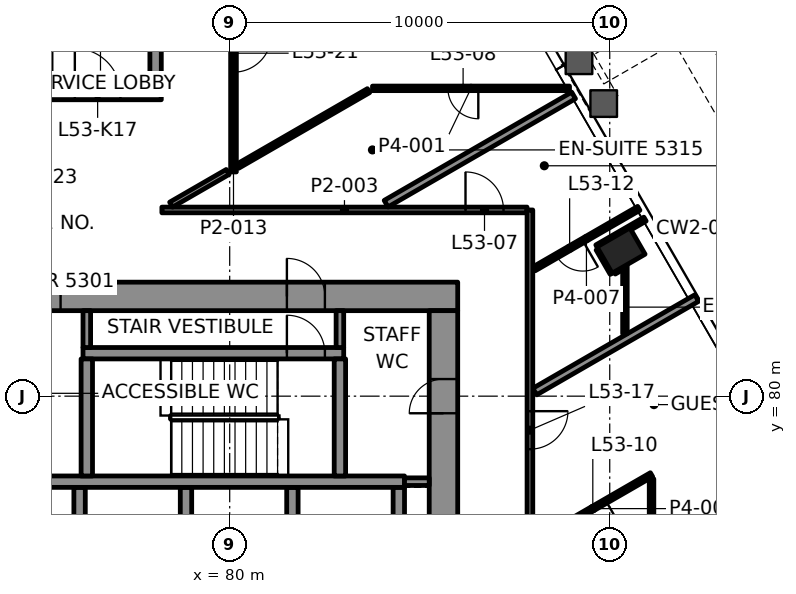
"""IFC4 building model, lengths in metres.
Left out: names, types, materials, properties, quantities, classifications, styles, units other than length and angle.
Written with IfcOpenShell. Run it as: python <this file> out.ifc"""

import sys

from ifc_helpers import new_model, si_unit, direction, frame, frame_2d, origin, origin_2d, place, context, subcontext, project, spatial, rectangle, hollow_rectangle, extrude, element, fill, save


model = new_model("IFC4")
c1 = context("Model", 3, precision=1e-05, world=origin(), true_north=direction((0.0, 1.0)))
c2 = subcontext(c1, "Body", "Model", "MODEL_VIEW")
j1 = project(units=[si_unit("LENGTHUNIT", "METRE"), si_unit("PLANEANGLEUNIT", "RADIAN")], contexts=[c1])
p1 = place(None, origin())
s1 = spatial("IfcSite", under=j1, at=p1, CompositionType="ELEMENT")
p2 = place(p1, origin())
s2 = spatial("IfcBuilding", under=s1, at=p2, CompositionType="ELEMENT")
p3 = place(p2, frame((0.0, 0.0, 226.0)))
s3 = spatial("IfcBuildingStorey", under=s2, at=p3, CompositionType="ELEMENT", Elevation=226.0)
p4 = place(p3, frame((90.297, 83.832, -0.0), z_axis=(0.0, 0.0, 1.0), x_axis=(-0.5, 0.866025403784, 0.0)))
e1 = element("IfcColumn", 1, at=p4, inside=s3, PredefinedType="COLUMN", context=c2, shape_type="SweptSolid", body=[
    extrude(hollow_rectangle(XDim=0.8, YDim=1.0, WallThickness=0.05, at=origin_2d()), origin(), (0.0, 0.0, 1.0), 3.9),
])
p5 = place(p3, frame((64.0, 82.625, 0.0), z_axis=(0.0, 0.0, 1.0), x_axis=(1.0, 0.0, 0.0)))
e2 = element("IfcWall", 2, at=p5, inside=s3, PredefinedType="SHEAR", context=c2, shape_type="SweptSolid", body=[
    extrude(rectangle(XDim=22.0, YDim=0.75, at=frame_2d((11.0, 0.0))), origin(), (0.0, 0.0, 1.0), 3.7),
])
p6 = place(p5, frame((3.695, 0.0, 0.0)))
e3 = element("IfcOpeningElement", 3, at=p6, cuts=e2, PredefinedType="OPENING", context=c2, shape_type="SweptSolid", body=[
    extrude(rectangle(XDim=1.0, YDim=2.1, at=frame_2d((0.5, 1.05))), frame((0.0, 0.385, 0.0), z_axis=(0.0, -1.0, 0.0), x_axis=(1.0, 0.0, 0.0)), (0.0, 0.0, 1.0), 0.77),
])
p7 = place(p5, frame((17.505, 0.0, 0.0)))
e4 = element("IfcOpeningElement", 4, at=p7, cuts=e2, PredefinedType="OPENING", context=c2, shape_type="SweptSolid", body=[
    extrude(rectangle(XDim=1.0, YDim=2.1, at=frame_2d((0.5, 1.05))), frame((0.0, 0.385, 0.0), z_axis=(0.0, -1.0, 0.0), x_axis=(1.0, 0.0, 0.0)), (0.0, 0.0, 1.0), 0.77),
])
p8 = place(p5, frame((10.65, 0.0, 0.0)))
e5 = element("IfcOpeningElement", 5, at=p8, cuts=e2, PredefinedType="OPENING", context=c2, shape_type="SweptSolid", body=[
    extrude(rectangle(XDim=0.9, YDim=2.1, at=frame_2d((0.45, 1.05))), frame((0.0, 0.385, 0.0), z_axis=(0.0, -1.0, 0.0), x_axis=(1.0, 0.0, 0.0)), (0.0, 0.0, 1.0), 0.77),
])
p9 = place(p3, frame((85.625, 67.75, 0.0), z_axis=(0.0, 0.0, 1.0), x_axis=(0.0, 1.0, 0.0)))
e6 = element("IfcWall", 6, at=p9, inside=s3, PredefinedType="SHEAR", context=c2, shape_type="SweptSolid", body=[
    extrude(rectangle(XDim=14.5, YDim=0.75, at=frame_2d((7.25, 0.0))), origin(), (0.0, 0.0, 1.0), 3.7),
])
p10 = place(p9, frame((4.65, 0.0, 0.0)))
e7 = element("IfcOpeningElement", 7, at=p10, cuts=e6, PredefinedType="OPENING", context=c2, shape_type="SweptSolid", body=[
    extrude(rectangle(XDim=1.8, YDim=2.1, at=frame_2d((0.9, 1.05))), frame((0.0, 0.385, 0.0), z_axis=(0.0, -1.0, 0.0), x_axis=(1.0, 0.0, 0.0)), (0.0, 0.0, 1.0), 0.77),
])
p11 = place(p9, frame((11.8, 0.0, 0.0)))
e8 = element("IfcOpeningElement", 8, at=p11, cuts=e6, PredefinedType="OPENING", context=c2, shape_type="SweptSolid", body=[
    extrude(rectangle(XDim=0.9, YDim=2.1, at=frame_2d((0.45, 1.05))), frame((0.0, 0.385, 0.0), z_axis=(0.0, -1.0, 0.0), x_axis=(1.0, 0.0, 0.0)), (0.0, 0.0, 1.0), 0.77),
])
for number, where, z_axis, x_axis in (
    (9, (76.05, 75.0, 0.0), (0.0, 0.0, 1.0), (0.0, 1.0, 0.0)),
    (10, (78.85, 75.0, 0.0), (0.0, 0.0, 1.0), (0.0, 1.0, 0.0)),
    (11, (81.65, 75.0, 0.0), (0.0, 0.0, 1.0), (0.0, 1.0, 0.0)),
    (12, (84.45, 75.0, 0.0), (0.0, 0.0, 1.0), (0.0, 1.0, 0.0)),
):
    element("IfcWall", number, at=place(p3, frame(where, z_axis=z_axis, x_axis=x_axis)), inside=s3, PredefinedType="SHEAR", context=c2, shape_type="SweptSolid", body=[
        extrude(rectangle(XDim=2.6, YDim=0.3, at=frame_2d((1.3, 0.0))), origin(), (0.0, 0.0, 1.0), 3.7),
    ])
p12 = place(p3, frame((67.15, 77.75, 0.0), z_axis=(0.0, 0.0, 1.0), x_axis=(1.0, 0.0, 0.0)))
e13 = element("IfcWall", 13, at=p12, inside=s3, PredefinedType="SHEAR", context=c2, shape_type="SweptSolid", body=[
    extrude(rectangle(XDim=17.45, YDim=0.3, at=frame_2d((8.725, 0.0))), origin(), (0.0, 0.0, 1.0), 3.7),
])
p13 = place(p12, frame((0.545, 0.0, 0.0)))
e14 = element("IfcOpeningElement", 14, at=p13, cuts=e13, PredefinedType="OPENING", context=c2, shape_type="SweptSolid", body=[
    extrude(rectangle(XDim=1.0, YDim=2.1, at=frame_2d((0.5, 1.05))), frame((0.0, 0.16, 0.0), z_axis=(0.0, -1.0, 0.0), x_axis=(1.0, 0.0, 0.0)), (0.0, 0.0, 1.0), 0.32),
])
p14 = place(p3, frame((76.14, 81.13, 0.0), z_axis=(0.0, 0.0, 1.0), x_axis=(1.0, 0.0, 0.0)))
e15 = element("IfcWall", 15, at=p14, inside=s3, PredefinedType="SHEAR", context=c2, shape_type="SweptSolid", body=[
    extrude(rectangle(XDim=6.86, YDim=0.3, at=frame_2d((3.43, 0.0))), origin(), (0.0, 0.0, 1.0), 3.7),
])
p15 = place(p14, frame((5.365, 0.0, 0.0)))
e16 = element("IfcOpeningElement", 16, at=p15, cuts=e15, PredefinedType="OPENING", context=c2, shape_type="SweptSolid", body=[
    extrude(rectangle(XDim=1.0, YDim=2.1, at=frame_2d((0.5, 1.05))), frame((0.0, 0.16, 0.0), z_axis=(0.0, -1.0, 0.0), x_axis=(1.0, 0.0, 0.0)), (0.0, 0.0, 1.0), 0.32),
])
for number, where, z_axis, x_axis in (
    (17, (76.24, 77.9, 0.0), (0.0, 0.0, 1.0), (0.0, 1.0, 0.0)),
    (18, (82.9, 77.9, 0.0), (0.0, 0.0, 1.0), (0.0, 1.0, 0.0)),
):
    element("IfcWall", number, at=place(p3, frame(where, z_axis=z_axis, x_axis=x_axis)), inside=s3, PredefinedType="SHEAR", context=c2, shape_type="SweptSolid", body=[
        extrude(rectangle(XDim=3.08, YDim=0.3, at=frame_2d((1.54, 0.0))), origin(), (0.0, 0.0, 1.0), 3.7),
    ])
p16 = place(p3, frame((71.8, 87.95, 0.0), z_axis=(0.0, 0.0, 1.0), x_axis=(1.0, 0.0, 0.0)))
e19 = element("IfcWall", 19, at=p16, inside=s3, PredefinedType="SHEAR", context=c2, shape_type="SweptSolid", body=[
    extrude(rectangle(XDim=6.4, YDim=0.3, at=frame_2d((3.2, 0.0))), origin(), (0.0, 0.0, 1.0), 3.7),
])
p17 = place(p16, frame((1.325, 0.0, 0.0)))
e20 = element("IfcOpeningElement", 20, at=p17, cuts=e19, PredefinedType="OPENING", context=c2, shape_type="SweptSolid", body=[
    extrude(rectangle(XDim=1.0, YDim=2.1, at=frame_2d((0.5, 1.05))), frame((0.0, 0.16, 0.0), z_axis=(0.0, -1.0, 0.0), x_axis=(1.0, 0.0, 0.0)), (0.0, 0.0, 1.0), 0.32),
])
p18 = place(p16, frame((4.125, 0.0, 0.0)))
e21 = element("IfcOpeningElement", 21, at=p18, cuts=e19, PredefinedType="OPENING", context=c2, shape_type="SweptSolid", body=[
    extrude(rectangle(XDim=1.2, YDim=2.1, at=frame_2d((0.6, 1.05))), frame((0.0, 0.16, 0.0), z_axis=(0.0, -1.0, 0.0), x_axis=(1.0, 0.0, 0.0)), (0.0, 0.0, 1.0), 0.32),
])
p19 = place(p3, frame((78.05, 88.1, 0.0), z_axis=(0.0, 0.0, 1.0), x_axis=(0.0, 1.0, 0.0)))
e22 = element("IfcWall", 22, at=p19, inside=s3, PredefinedType="SHEAR", context=c2, shape_type="SweptSolid", body=[
    extrude(rectangle(XDim=6.2, YDim=0.3, at=frame_2d((3.1, 0.0))), origin(), (0.0, 0.0, 1.0), 3.7),
])
p20 = place(p3, frame((78.215, 84.9, 0.0), z_axis=(0.0, 0.0, 1.0), x_axis=(1.0, 0.0, 0.0)))
e23 = element("IfcWall", 23, at=p20, inside=s3, PredefinedType="PARTITIONING", context=c2, shape_type="SweptSolid", body=[
    extrude(rectangle(XDim=9.609, YDim=0.15, at=frame_2d((4.805, 0.0))), origin(), (0.0, 0.0, 1.0), 3.097),
])
p21 = place(p20, frame((7.99, 0.0, 0.0)))
e24 = element("IfcOpeningElement", 24, at=p21, cuts=e23, PredefinedType="OPENING", context=c2, shape_type="SweptSolid", body=[
    extrude(rectangle(XDim=1.0, YDim=2.1, at=frame_2d((0.5, 1.05))), frame((0.0, 0.085, 0.0), z_axis=(0.0, -1.0, 0.0), x_axis=(1.0, 0.0, 0.0)), (0.0, 0.0, 1.0), 0.17),
])
p22 = place(p3, frame((88.941, 88.1, 0.0), z_axis=(0.0, 0.0, 1.0), x_axis=(-1.0, 0.0, 0.0)))
e25 = element("IfcWall", 25, at=p22, inside=s3, PredefinedType="PARTITIONING", context=c2, shape_type="SweptSolid", body=[
    extrude(rectangle(XDim=5.183, YDim=0.12, at=frame_2d((2.592, 0.0))), origin(), (0.0, 0.0, 1.0), 3.022),
])
p23 = place(p22, frame((2.399, 0.0, 0.0)))
e26 = element("IfcOpeningElement", 26, at=p23, cuts=e25, PredefinedType="OPENING", context=c2, shape_type="SweptSolid", body=[
    extrude(rectangle(XDim=0.8, YDim=2.1, at=frame_2d((0.4, 1.05))), frame((0.0, 0.07, 0.0), z_axis=(0.0, -1.0, 0.0), x_axis=(1.0, 0.0, 0.0)), (0.0, 0.0, 1.0), 0.14),
])
p24 = place(p3, frame((91.1, 77.933, 0.0), z_axis=(0.0, 0.0, 1.0), x_axis=(-0.866045460162, -0.499965259726, 0.0)))
e27 = element("IfcWall", 27, at=p24, inside=s3, PredefinedType="PARTITIONING", context=c2, shape_type="SweptSolid", body=[
    extrude(rectangle(XDim=3.569, YDim=0.12, at=frame_2d((1.784, 0.0))), origin(), (0.0, 0.0, 1.0), 3.1),
])
p25 = place(p24, frame((1.384, 0.0, 0.0)))
e28 = element("IfcOpeningElement", 28, at=p25, cuts=e27, PredefinedType="OPENING", context=c2, shape_type="SweptSolid", body=[
    extrude(rectangle(XDim=0.8, YDim=2.1, at=frame_2d((0.4, 1.05))), frame((0.0, 0.07, 0.0), z_axis=(0.0, -1.0, 0.0), x_axis=(1.0, 0.0, 0.0)), (0.0, 0.0, 1.0), 0.14),
])
p26 = place(p3, frame((88.027, 80.12, 0.0), z_axis=(0.0, 0.0, 1.0), x_axis=(0.866024509183, 0.500001549491, 0.0)))
e29 = element("IfcWall", 29, at=p26, inside=s3, PredefinedType="PARTITIONING", context=c2, shape_type="SweptSolid", body=[
    extrude(rectangle(XDim=4.922, YDim=0.2, at=frame_2d((2.461, 0.0))), origin(), (0.0, 0.0, 1.0), 3.022),
])
p27 = place(p3, frame((90.116, 83.265, 0.0), z_axis=(0.0, 0.0, 1.0), x_axis=(0.866036909293, 0.499980071345, 0.0)))
e30 = element("IfcWall", 30, at=p27, inside=s3, PredefinedType="PARTITIONING", context=c2, shape_type="SweptSolid", body=[
    extrude(rectangle(XDim=0.219, YDim=0.12, at=frame_2d((0.109, 0.0))), origin(), (0.0, 0.0, 1.0), 3.1),
])
p28 = place(p3, frame((89.664, 83.928, 0.0), z_axis=(0.0, 0.0, 1.0), x_axis=(0.866032430508, 0.49998782916, 0.0)))
e31 = element("IfcWall", 31, at=p28, inside=s3, PredefinedType="PARTITIONING", context=c2, shape_type="SweptSolid", body=[
    extrude(rectangle(XDim=1.46, YDim=0.12, at=frame_2d((0.73, 0.0))), origin(), (0.0, 0.0, 1.0), 3.022),
])
p29 = place(p3, frame((90.764, 84.942, 0.0), z_axis=(0.0, 0.0, 1.0), x_axis=(-0.866052668871, -0.499952772512, 0.0)))
e32 = element("IfcWall", 32, at=p29, inside=s3, PredefinedType="PARTITIONING", context=c2, shape_type="SweptSolid", body=[
    extrude(rectangle(XDim=3.181, YDim=0.12, at=frame_2d((1.59, 0.0))), origin(), (0.0, 0.0, 1.0), 3.022),
])
p30 = place(p29, frame((1.701, 0.0, 0.0)))
e33 = element("IfcOpeningElement", 33, at=p30, cuts=e32, PredefinedType="OPENING", context=c2, shape_type="SweptSolid", body=[
    extrude(rectangle(XDim=0.8, YDim=2.1, at=frame_2d((0.4, 1.05))), frame((0.0, 0.07, 0.0), z_axis=(0.0, -1.0, 0.0), x_axis=(1.0, 0.0, 0.0)), (0.0, 0.0, 1.0), 0.14),
])
p31 = place(p3, frame((84.115, 85.065, 0.0), z_axis=(0.0, 0.0, 1.0), x_axis=(0.866027152591, 0.499996970966, 0.0)))
e34 = element("IfcWall", 34, at=p31, inside=s3, PredefinedType="PARTITIONING", context=c2, shape_type="SweptSolid", body=[
    extrude(rectangle(XDim=5.697, YDim=0.2, at=frame_2d((2.848, 0.0))), origin(), (0.0, 0.0, 1.0), 3.022),
])
p32 = place(p3, frame((78.458, 85.04, 0.0), z_axis=(0.0, 0.0, 1.0), x_axis=(0.865989383878, 0.500062383118, 0.0)))
e35 = element("IfcWall", 35, at=p32, inside=s3, PredefinedType="PARTITIONING", context=c2, shape_type="SweptSolid", body=[
    extrude(rectangle(XDim=1.72, YDim=0.15, at=frame_2d((0.86, 0.0))), origin(), (0.0, 0.0, 1.0), 3.1),
])
p33 = place(p3, frame((80.209, 86.052, 0.0), z_axis=(0.0, 0.0, 1.0), x_axis=(0.866032250876, 0.499988140302, 0.0)))
e36 = element("IfcWall", 36, at=p33, inside=s3, PredefinedType="PARTITIONING", context=c2, shape_type="SweptSolid", body=[
    extrude(rectangle(XDim=3.977, YDim=0.12, at=frame_2d((1.989, 0.0))), origin(), (0.0, 0.0, 1.0), 3.1),
])
p34 = place(p3, frame((91.1, 74.8, 0.0), z_axis=(0.0, 0.0, 1.0), x_axis=(0.0, 1.0, 0.0)))
e37 = element("IfcWall", 37, at=p34, inside=s3, PredefinedType="PARTITIONING", context=c2, shape_type="SweptSolid", body=[
    extrude(rectangle(XDim=3.023, YDim=0.12, at=frame_2d((1.511, 0.0))), origin(), (0.0, 0.0, 1.0), 3.1),
])
p35 = place(p3, frame((90.4, 81.646, 0.0), z_axis=(0.0, 0.0, 1.0), x_axis=(0.0, 1.0, 0.0)))
e38 = element("IfcWall", 38, at=p35, inside=s3, PredefinedType="PARTITIONING", context=c2, shape_type="SweptSolid", body=[
    extrude(rectangle(XDim=1.784, YDim=0.12, at=frame_2d((0.892, 0.0))), origin(), (0.0, 0.0, 1.0), 3.022),
])
p36 = place(p3, frame((87.9, 84.899, 0.0), z_axis=(0.0, 0.0, 1.0), x_axis=(0.0, -1.0, 0.0)))
e39 = element("IfcWall", 39, at=p36, inside=s3, PredefinedType="PARTITIONING", context=c2, shape_type="SweptSolid", body=[
    extrude(rectangle(XDim=16.308, YDim=0.15, at=frame_2d((8.154, 0.0))), origin(), (0.0, 0.0, 1.0), 3.1),
])
p37 = place(p36, frame((5.294, 0.0, 0.0)))
e40 = element("IfcOpeningElement", 40, at=p37, cuts=e39, PredefinedType="OPENING", context=c2, shape_type="SweptSolid", body=[
    extrude(rectangle(XDim=1.0, YDim=2.1, at=frame_2d((0.5, 1.05))), frame((0.0, 0.085, 0.0), z_axis=(0.0, -1.0, 0.0), x_axis=(1.0, 0.0, 0.0)), (0.0, 0.0, 1.0), 0.17),
])
p38 = place(p36, frame((13.58, 0.0, 0.0)))
e41 = element("IfcOpeningElement", 41, at=p38, cuts=e39, PredefinedType="OPENING", context=c2, shape_type="SweptSolid", body=[
    extrude(rectangle(XDim=1.0, YDim=2.1, at=frame_2d((0.5, 1.05))), frame((0.0, 0.085, 0.0), z_axis=(0.0, -1.0, 0.0), x_axis=(1.0, 0.0, 0.0)), (0.0, 0.0, 1.0), 0.17),
])
p39 = place(p3, frame((80.1, 96.5, 0.0), z_axis=(0.0, 0.0, 1.0), x_axis=(0.0, -1.0, 0.0)))
e42 = element("IfcWall", 42, at=p39, inside=s3, PredefinedType="PARTITIONING", context=c2, shape_type="SweptSolid", body=[
    extrude(rectangle(XDim=10.6, YDim=0.15, at=frame_2d((5.3, 0.0))), origin(), (0.0, 0.0, 1.0), 3.1),
])
p40 = place(p39, frame((1.125, 0.0, 0.0)))
e43 = element("IfcOpeningElement", 43, at=p40, cuts=e42, PredefinedType="OPENING", context=c2, shape_type="SweptSolid", body=[
    extrude(rectangle(XDim=0.9, YDim=2.1, at=frame_2d((0.45, 1.05))), frame((0.0, 0.085, 0.0), z_axis=(0.0, -1.0, 0.0), x_axis=(1.0, 0.0, 0.0)), (0.0, 0.0, 1.0), 0.17),
])
p41 = place(p39, frame((4.299, 0.0, 0.0)))
e44 = element("IfcOpeningElement", 44, at=p41, cuts=e42, PredefinedType="OPENING", context=c2, shape_type="SweptSolid", body=[
    extrude(rectangle(XDim=0.9, YDim=2.1, at=frame_2d((0.45, 1.05))), frame((0.0, 0.085, 0.0), z_axis=(0.0, -1.0, 0.0), x_axis=(1.0, 0.0, 0.0)), (0.0, 0.0, 1.0), 0.17),
])
p42 = place(p39, frame((6.974, 0.0, 0.0)))
e45 = element("IfcOpeningElement", 45, at=p42, cuts=e42, PredefinedType="OPENING", context=c2, shape_type="SweptSolid", body=[
    extrude(rectangle(XDim=1.0, YDim=2.1, at=frame_2d((0.5, 1.05))), frame((0.0, 0.085, 0.0), z_axis=(0.0, -1.0, 0.0), x_axis=(1.0, 0.0, 0.0)), (0.0, 0.0, 1.0), 0.17),
])
p43 = place(p3, frame((90.064, 83.235, 0.0), z_axis=(0.0, 0.0, 1.0), x_axis=(-0.500112705049, 0.865960323715, 0.0)))
e46 = element("IfcWall", 46, at=p43, inside=s3, PredefinedType="PARTITIONING", context=c2, shape_type="SweptSolid", body=[
    extrude(rectangle(XDim=0.74, YDim=0.12, at=frame_2d((0.37, 0.0))), origin(), (0.0, 0.0, 1.0), 3.1),
])
p44 = place(p3, frame((107.245, 63.176, 0.0), z_axis=(0.0, 0.0, 1.0), x_axis=(-0.500002275173, 0.866024090209, 0.0)))
e47 = element("IfcWall", 47, at=p44, inside=s3, PredefinedType="SOLIDWALL", context=c2, shape_type="SweptSolid", body=[
    extrude(rectangle(XDim=30.436, YDim=0.8, at=frame_2d((15.218, 0.0))), origin(), (0.0, 0.0, 1.0), 0.9),
])
p45 = place(p3, frame((91.549, 89.663, 0.0), z_axis=(0.0, 0.0, 1.0), x_axis=(-0.866008176907, -0.50002983664, 0.0)))
e48 = element("IfcWall", 48, at=p45, inside=s3, PredefinedType="SOLIDWALL", context=c2, shape_type="SweptSolid", body=[
    extrude(rectangle(XDim=2.2, YDim=0.8, at=frame_2d((1.1, 0.0))), origin(), (0.0, 0.0, 1.0), 0.9),
])
p46 = place(p3, frame((84.6, 77.75, 0.0), z_axis=(0.0, 0.0, 1.0), x_axis=(1.0, 0.0, 0.0)))
e49 = element("IfcWall", 49, at=p46, inside=s3, PredefinedType="PARTITIONING", context=c2, shape_type="SweptSolid", body=[
    extrude(rectangle(XDim=0.65, YDim=0.2, at=frame_2d((0.325, 0.0))), origin(), (0.0, 0.0, 1.0), 3.7),
])
for number, where, z_axis, x_axis in (
    (50, (76.24, 81.28, 0.0), (0.0, 0.0, 1.0), (0.0, 1.0, 0.0)),
    (51, (82.9, 81.28, 0.0), (0.0, 0.0, 1.0), (0.0, 1.0, 0.0)),
):
    element("IfcWall", number, at=place(p3, frame(where, z_axis=z_axis, x_axis=x_axis)), inside=s3, PredefinedType="PARTITIONING", context=c2, shape_type="SweptSolid", body=[
        extrude(rectangle(XDim=0.97, YDim=0.2, at=frame_2d((0.485, 0.0))), origin(), (0.0, 0.0, 1.0), 3.7),
    ])
p47 = place(p21, origin())
e52 = element("IfcDoor", 52, at=p47, inside=s3, OperationType="SINGLE_SWING_LEFT", PredefinedType="DOOR", context=c2, shape_type="SweptSolid", body=[
    extrude(rectangle(XDim=1.0, YDim=2.1, at=frame_2d((0.5, 1.05))), frame((0.0, 0.025, 0.0), z_axis=(0.0, -1.0, 0.0), x_axis=(1.0, 0.0, 0.0)), (0.0, 0.0, 1.0), 0.05),
])
fill(e24, e52)
p48 = place(p23, origin())
e53 = element("IfcDoor", 53, at=p48, inside=s3, OperationType="SINGLE_SWING_LEFT", PredefinedType="DOOR", context=c2, shape_type="SweptSolid", body=[
    extrude(rectangle(XDim=0.8, YDim=2.1, at=frame_2d((0.4, 1.05))), frame((0.0, 0.025, 0.0), z_axis=(0.0, -1.0, 0.0), x_axis=(1.0, 0.0, 0.0)), (0.0, 0.0, 1.0), 0.05),
])
fill(e26, e53)
p49 = place(p25, origin())
e54 = element("IfcDoor", 54, at=p49, inside=s3, OperationType="SINGLE_SWING_LEFT", PredefinedType="DOOR", context=c2, shape_type="SweptSolid", body=[
    extrude(rectangle(XDim=0.8, YDim=2.1, at=frame_2d((0.4, 1.05))), frame((0.0, 0.025, 0.0), z_axis=(0.0, -1.0, 0.0), x_axis=(1.0, 0.0, 0.0)), (0.0, 0.0, 1.0), 0.05),
])
fill(e28, e54)
p50 = place(p30, origin())
e55 = element("IfcDoor", 55, at=p50, inside=s3, OperationType="SINGLE_SWING_LEFT", PredefinedType="DOOR", context=c2, shape_type="SweptSolid", body=[
    extrude(rectangle(XDim=0.8, YDim=2.1, at=frame_2d((0.4, 1.05))), frame((0.0, 0.025, 0.0), z_axis=(0.0, -1.0, 0.0), x_axis=(1.0, 0.0, 0.0)), (0.0, 0.0, 1.0), 0.05),
])
fill(e33, e55)
p51 = place(p37, origin())
e56 = element("IfcDoor", 56, at=p51, inside=s3, OperationType="SINGLE_SWING_RIGHT", PredefinedType="DOOR", context=c2, shape_type="SweptSolid", body=[
    extrude(rectangle(XDim=1.0, YDim=2.1, at=frame_2d((0.5, 1.05))), frame((0.0, 0.025, 0.0), z_axis=(0.0, -1.0, 0.0), x_axis=(1.0, 0.0, 0.0)), (0.0, 0.0, 1.0), 0.05),
])
fill(e40, e56)
p52 = place(p42, origin())
e57 = element("IfcDoor", 57, at=p52, inside=s3, OperationType="SINGLE_SWING_RIGHT", PredefinedType="DOOR", context=c2, shape_type="SweptSolid", body=[
    extrude(rectangle(XDim=1.0, YDim=2.1, at=frame_2d((0.5, 1.05))), frame((0.0, 0.025, 0.0), z_axis=(0.0, -1.0, 0.0), x_axis=(1.0, 0.0, 0.0)), (0.0, 0.0, 1.0), 0.05),
])
fill(e45, e57)
p53 = place(p15, origin())
e58 = element("IfcDoor", 58, at=p53, inside=s3, OperationType="SINGLE_SWING_RIGHT", PredefinedType="DOOR", context=c2, shape_type="SweptSolid", body=[
    extrude(rectangle(XDim=1.0, YDim=2.1, at=frame_2d((0.5, 1.05))), frame((0.0, 0.025, 0.0), z_axis=(0.0, -1.0, 0.0), x_axis=(1.0, 0.0, 0.0)), (0.0, 0.0, 1.0), 0.05),
])
fill(e16, e58)
p54 = place(p7, origin())
e59 = element("IfcDoor", 59, at=p54, inside=s3, OperationType="SINGLE_SWING_LEFT", PredefinedType="DOOR", context=c2, shape_type="SweptSolid", body=[
    extrude(rectangle(XDim=1.0, YDim=2.1, at=frame_2d((0.5, 1.05))), frame((0.0, 0.095, 0.0), z_axis=(0.0, -1.0, 0.0), x_axis=(1.0, 0.0, 0.0)), (0.0, 0.0, 1.0), 0.19),
])
fill(e4, e59)
p55 = place(p18, origin())
e60 = element("IfcDoor", 60, at=p55, inside=s3, OperationType="SINGLE_SWING_RIGHT", PredefinedType="DOOR", context=c2, shape_type="SweptSolid", body=[
    extrude(rectangle(XDim=1.2, YDim=2.1, at=frame_2d((0.6, 1.05))), frame((0.0, 0.025, 0.0), z_axis=(0.0, -1.0, 0.0), x_axis=(1.0, 0.0, 0.0)), (0.0, 0.0, 1.0), 0.05),
])
fill(e21, e60)
p56 = place(p8, origin())
e61 = element("IfcDoor", 61, at=p56, inside=s3, OperationType="SINGLE_SWING_RIGHT", PredefinedType="DOOR", context=c2, shape_type="SweptSolid", body=[
    extrude(rectangle(XDim=0.9, YDim=2.1, at=frame_2d((0.45, 1.05))), frame((0.0, 0.095, 0.0), z_axis=(0.0, -1.0, 0.0), x_axis=(1.0, 0.0, 0.0)), (0.0, 0.0, 1.0), 0.19),
])
fill(e5, e61)
p57 = place(p11, origin())
e62 = element("IfcDoor", 62, at=p57, inside=s3, OperationType="SINGLE_SWING_LEFT", PredefinedType="DOOR", context=c2, shape_type="SweptSolid", body=[
    extrude(rectangle(XDim=0.9, YDim=2.1, at=frame_2d((0.45, 1.05))), frame((0.0, 0.095, 0.0), z_axis=(0.0, -1.0, 0.0), x_axis=(1.0, 0.0, 0.0)), (0.0, 0.0, 1.0), 0.19),
])
fill(e8, e62)
save(model, sys.argv[1])
